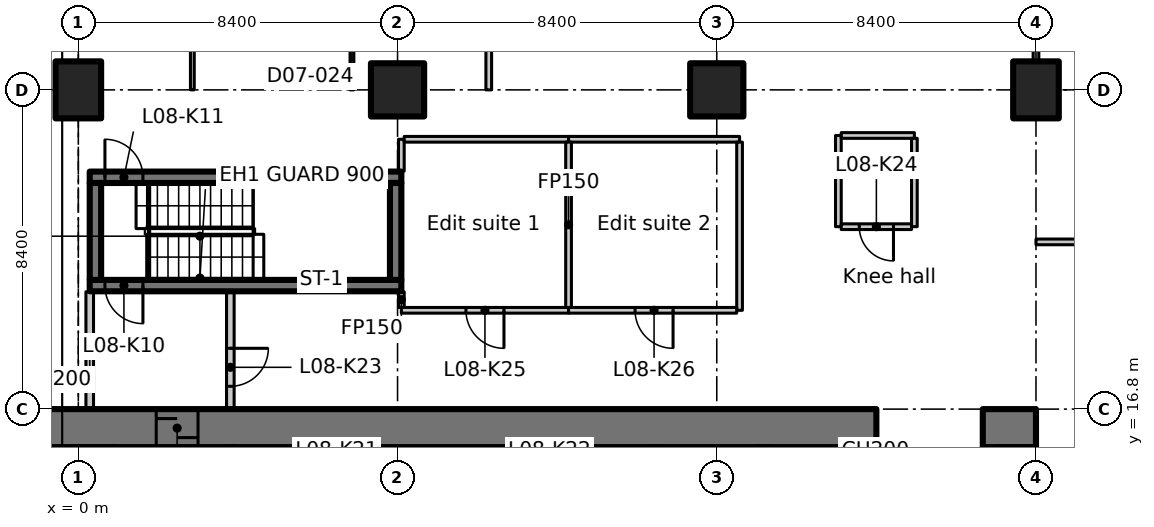
"""IFC4 building model, lengths in metres.
Left out: names, types, materials, properties, quantities, classifications, styles, units other than length and angle.
Written with IfcOpenShell. Run it as: python <this file> out.ifc"""

import sys

from ifc_helpers import new_model, si_unit, direction, frame, frame_2d, origin, origin_2d, place, context, subcontext, project, spatial, polyline, rectangle, outline, extrude, element, fill, save


model = new_model("IFC4")
c1 = context("Model", 3, precision=1e-05, world=origin(), true_north=direction((0.0, 1.0)))
c2 = subcontext(c1, "Body", "Model", "MODEL_VIEW")
j1 = project(units=[si_unit("LENGTHUNIT", "METRE"), si_unit("PLANEANGLEUNIT", "RADIAN")], contexts=[c1])
p1 = place(None, origin())
s1 = spatial("IfcSite", under=j1, at=p1, CompositionType="ELEMENT")
p2 = place(p1, origin())
s2 = spatial("IfcBuilding", under=s1, at=p2, CompositionType="ELEMENT")
p3 = place(p2, frame((0.0, 0.0, 43.7)))
s3 = spatial("IfcBuildingStorey", under=s2, at=p3, CompositionType="ELEMENT", Elevation=43.7)
p4 = place(p3, frame((0.0, 25.2, 0.0), z_axis=(0.0, 0.0, 1.0), x_axis=(1.0, 0.0, 0.0)))
e1 = element("IfcColumn", 1, at=p4, inside=s3, PredefinedType="COLUMN", context=c2, shape_type="SweptSolid", body=[
    extrude(rectangle(XDim=1.2, YDim=1.5, at=origin_2d()), origin(), (0.0, 0.0, 1.0), 3.35),
])
for number, where, z_axis, x_axis in (
    (2, (8.4, 25.2, 0.0), (0.0, 0.0, 1.0), (1.0, 0.0, 0.0)),
    (3, (16.8, 25.2, 0.0), (0.0, 0.0, 1.0), (1.0, 0.0, 0.0)),
):
    element("IfcColumn", number, at=place(p3, frame(where, z_axis=z_axis, x_axis=x_axis)), inside=s3, PredefinedType="COLUMN", context=c2, shape_type="SweptSolid", body=[
        extrude(rectangle(XDim=1.4, YDim=1.4, at=origin_2d()), origin(), (0.0, 0.0, 1.0), 3.35),
    ])
p5 = place(p3, frame((25.2, 25.2, 0.0), z_axis=(0.0, 0.0, 1.0), x_axis=(1.0, 0.0, 0.0)))
e4 = element("IfcColumn", 4, at=p5, inside=s3, PredefinedType="COLUMN", context=c2, shape_type="SweptSolid", body=[
    extrude(rectangle(XDim=1.2, YDim=1.5, at=origin_2d()), origin(), (0.0, 0.0, 1.0), 3.35),
])
p6 = place(p3, frame((-1.1, 16.3, 0.0), z_axis=(0.0, 0.0, 1.0), x_axis=(1.0, 0.0, 0.0)))
e5 = element("IfcWall", 5, at=p6, inside=s3, PredefinedType="SHEAR", context=c2, shape_type="SweptSolid", body=[
    extrude(rectangle(XDim=22.1, YDim=1.0, at=frame_2d((11.05, 0.0))), origin(), (0.0, 0.0, 1.0), 3.35),
])
p7 = place(p6, frame((3.15, 0.0, 0.0)))
e6 = element("IfcOpeningElement", 6, at=p7, cuts=e5, PredefinedType="OPENING", context=c2, shape_type="SweptSolid", body=[
    extrude(rectangle(XDim=1.1, YDim=2.3, at=frame_2d((0.55, 1.15))), frame((0.0, 0.51, 0.0), z_axis=(0.0, -1.0, 0.0), x_axis=(1.0, 0.0, 0.0)), (0.0, 0.0, 1.0), 1.02),
])
p8 = place(p3, frame((23.8, 16.3, 0.0), z_axis=(0.0, 0.0, 1.0), x_axis=(1.0, 0.0, 0.0)))
e7 = element("IfcWall", 7, at=p8, inside=s3, PredefinedType="SHEAR", context=c2, shape_type="SweptSolid", body=[
    extrude(rectangle(XDim=1.4, YDim=1.0, at=frame_2d((0.7, 0.0))), origin(), (0.0, 0.0, 1.0), 3.35),
])
p9 = place(p3, frame((24.7, 12.6, 0.0), z_axis=(0.0, 0.0, 1.0), x_axis=(0.0, 1.0, 0.0)))
e8 = element("IfcWall", 8, at=p9, inside=s3, PredefinedType="SHEAR", context=c2, shape_type="SweptSolid", body=[
    extrude(rectangle(XDim=3.2, YDim=1.0, at=frame_2d((1.6, 0.0))), origin(), (0.0, 0.0, 1.0), 3.35),
])
p10 = place(p3, frame((8.5, 20.05, 0.0), z_axis=(0.0, 0.0, 1.0), x_axis=(-1.0, 0.0, 0.0)))
e9 = element("IfcWall", 9, at=p10, inside=s3, PredefinedType="SHEAR", context=c2, shape_type="SweptSolid", body=[
    extrude(rectangle(XDim=8.2, YDim=0.3, at=frame_2d((4.1, 0.0))), origin(), (0.0, 0.0, 1.0), 3.35),
])
p11 = place(p10, frame((6.8, 0.0, 0.0)))
e10 = element("IfcOpeningElement", 10, at=p11, cuts=e9, PredefinedType="OPENING", context=c2, shape_type="SweptSolid", body=[
    extrude(rectangle(XDim=1.0, YDim=2.1, at=frame_2d((0.5, 1.05))), frame((0.0, 0.16, 0.0), z_axis=(0.0, -1.0, 0.0), x_axis=(1.0, 0.0, 0.0)), (0.0, 0.0, 1.0), 0.32),
])
p12 = place(p3, frame((0.3, 22.9, 0.0), z_axis=(0.0, 0.0, 1.0), x_axis=(1.0, 0.0, 0.0)))
e11 = element("IfcWall", 11, at=p12, inside=s3, PredefinedType="SHEAR", context=c2, shape_type="SweptSolid", body=[
    extrude(rectangle(XDim=8.2, YDim=0.3, at=frame_2d((4.1, 0.0))), origin(), (0.0, 0.0, 1.0), 3.35),
])
p13 = place(p12, frame((0.4, 0.0, 0.0)))
e12 = element("IfcOpeningElement", 12, at=p13, cuts=e11, PredefinedType="OPENING", context=c2, shape_type="SweptSolid", body=[
    extrude(rectangle(XDim=1.0, YDim=2.1, at=frame_2d((0.5, 1.05))), frame((0.0, 0.16, 0.0), z_axis=(0.0, -1.0, 0.0), x_axis=(1.0, 0.0, 0.0)), (0.0, 0.0, 1.0), 0.32),
])
for number, where, z_axis, x_axis in (
    (13, (0.45, 20.2, 0.0), (0.0, 0.0, 1.0), (0.0, 1.0, 0.0)),
    (14, (8.35, 20.2, 0.0), (0.0, 0.0, 1.0), (0.0, 1.0, 0.0)),
):
    element("IfcWall", number, at=place(p3, frame(where, z_axis=z_axis, x_axis=x_axis)), inside=s3, PredefinedType="SHEAR", context=c2, shape_type="SweptSolid", body=[
        extrude(rectangle(XDim=2.55, YDim=0.3, at=frame_2d((1.275, 0.0))), origin(), (0.0, 0.0, 1.0), 3.35),
    ])
p14 = place(p3, frame((0.3, 16.812, 0.0), z_axis=(0.0, 0.0, 1.0), x_axis=(0.0, 1.0, 0.0)))
e15 = element("IfcWall", 15, at=p14, inside=s3, PredefinedType="PARTITIONING", context=c2, shape_type="SweptSolid", body=[
    extrude(rectangle(XDim=3.076, YDim=0.2, at=frame_2d((1.538, 0.0))), origin(), (0.0, 0.0, 1.0), 2.98),
])
p15 = place(p3, frame((4.0, 19.888, 0.0), z_axis=(0.0, 0.0, 1.0), x_axis=(0.0, -1.0, 0.0)))
e16 = element("IfcWall", 16, at=p15, inside=s3, PredefinedType="PARTITIONING", context=c2, shape_type="SweptSolid", body=[
    extrude(rectangle(XDim=3.076, YDim=0.2, at=frame_2d((1.538, 0.0))), origin(), (0.0, 0.0, 1.0), 3.35),
])
p16 = place(p15, frame((1.488, 0.0, 0.0)))
e17 = element("IfcOpeningElement", 17, at=p16, cuts=e16, PredefinedType="OPENING", context=c2, shape_type="SweptSolid", body=[
    extrude(rectangle(XDim=1.0, YDim=2.1, at=frame_2d((0.5, 1.05))), frame((0.0, 0.11, 0.0), z_axis=(0.0, -1.0, 0.0), x_axis=(1.0, 0.0, 0.0)), (0.0, 0.0, 1.0), 0.22),
])
p17 = place(p3, frame((12.9, 19.4, 0.0), z_axis=(0.0, 0.0, 1.0), x_axis=(-1.0, 0.0, 0.0)))
e18 = element("IfcWall", 18, at=p17, inside=s3, PredefinedType="PARTITIONING", context=c2, shape_type="SweptSolid", body=[
    extrude(rectangle(XDim=4.4, YDim=0.15, at=frame_2d((2.2, 0.0))), origin(), (0.0, 0.0, 1.0), 3.35),
])
p18 = place(p17, frame((1.7, 0.0, 0.0)))
e19 = element("IfcOpeningElement", 19, at=p18, cuts=e18, PredefinedType="OPENING", context=c2, shape_type="SweptSolid", body=[
    extrude(rectangle(XDim=1.0, YDim=2.1, at=frame_2d((0.5, 1.05))), frame((0.0, 0.085, 0.0), z_axis=(0.0, -1.0, 0.0), x_axis=(1.0, 0.0, 0.0)), (0.0, 0.0, 1.0), 0.17),
])
p19 = place(p3, frame((8.5, 19.475, 0.0), z_axis=(0.0, 0.0, 1.0), x_axis=(0.0, 1.0, 0.0)))
e20 = element("IfcWall", 20, at=p19, inside=s3, PredefinedType="PARTITIONING", context=c2, shape_type="SweptSolid", body=[
    extrude(rectangle(XDim=0.413, YDim=0.15, at=frame_2d((0.207, 0.0))), origin(), (0.0, 0.0, 1.0), 3.35),
])
p20 = place(p3, frame((8.5, 23.062, 0.0), z_axis=(0.0, 0.0, 1.0), x_axis=(0.0, 1.0, 0.0)))
e21 = element("IfcWall", 21, at=p20, inside=s3, PredefinedType="PARTITIONING", context=c2, shape_type="SweptSolid", body=[
    extrude(rectangle(XDim=0.838, YDim=0.15, at=frame_2d((0.419, 0.0))), origin(), (0.0, 0.0, 1.0), 3.35),
])
p21 = place(p3, frame((8.575, 23.9, 0.0), z_axis=(0.0, 0.0, 1.0), x_axis=(1.0, 0.0, 0.0)))
e22 = element("IfcWall", 22, at=p21, inside=s3, PredefinedType="PARTITIONING", context=c2, shape_type="SweptSolid", body=[
    extrude(rectangle(XDim=4.325, YDim=0.15, at=frame_2d((2.163, 0.0))), origin(), (0.0, 0.0, 1.0), 3.35),
])
p22 = place(p3, frame((12.9, 23.9, 0.0), z_axis=(0.0, 0.0, 1.0), x_axis=(1.0, 0.0, 0.0)))
e23 = element("IfcWall", 23, at=p22, inside=s3, PredefinedType="PARTITIONING", context=c2, shape_type="SweptSolid", body=[
    extrude(rectangle(XDim=4.5, YDim=0.15, at=frame_2d((2.25, 0.0))), origin(), (0.0, 0.0, 1.0), 3.35),
])
p23 = place(p3, frame((17.4, 23.825, 0.0), z_axis=(0.0, 0.0, 1.0), x_axis=(0.0, -1.0, 0.0)))
e24 = element("IfcWall", 24, at=p23, inside=s3, PredefinedType="PARTITIONING", context=c2, shape_type="SweptSolid", body=[
    extrude(rectangle(XDim=4.425, YDim=0.15, at=frame_2d((2.212, 0.0))), origin(), (0.0, 0.0, 1.0), 3.35),
])
p24 = place(p3, frame((17.325, 19.4, 0.0), z_axis=(0.0, 0.0, 1.0), x_axis=(-1.0, 0.0, 0.0)))
e25 = element("IfcWall", 25, at=p24, inside=s3, PredefinedType="PARTITIONING", context=c2, shape_type="SweptSolid", body=[
    extrude(rectangle(XDim=4.425, YDim=0.15, at=frame_2d((2.212, 0.0))), origin(), (0.0, 0.0, 1.0), 3.35),
])
p25 = place(p24, frame((1.675, 0.0, 0.0)))
e26 = element("IfcOpeningElement", 26, at=p25, cuts=e25, PredefinedType="OPENING", context=c2, shape_type="SweptSolid", body=[
    extrude(rectangle(XDim=1.0, YDim=2.1, at=frame_2d((0.5, 1.05))), frame((0.0, 0.085, 0.0), z_axis=(0.0, -1.0, 0.0), x_axis=(1.0, 0.0, 0.0)), (0.0, 0.0, 1.0), 0.17),
])
p26 = place(p3, frame((12.9, 23.825, 0.0), z_axis=(0.0, 0.0, 1.0), x_axis=(0.0, -1.0, 0.0)))
e27 = element("IfcWall", 27, at=p26, inside=s3, PredefinedType="PARTITIONING", context=c2, shape_type="SweptSolid", body=[
    extrude(rectangle(XDim=4.35, YDim=0.15, at=frame_2d((2.175, 0.0))), origin(), (0.0, 0.0, 1.0), 3.35),
])
p27 = place(p3, frame((20.0, 21.6, 0.0), z_axis=(0.0, 0.0, 1.0), x_axis=(0.0, 1.0, 0.0)))
e28 = element("IfcWall", 28, at=p27, inside=s3, PredefinedType="PARTITIONING", context=c2, shape_type="SweptSolid", body=[
    extrude(rectangle(XDim=2.4, YDim=0.15, at=frame_2d((1.2, 0.0))), origin(), (0.0, 0.0, 1.0), 3.35),
])
p28 = place(p3, frame((20.075, 24.0, 0.0), z_axis=(0.0, 0.0, 1.0), x_axis=(1.0, 0.0, 0.0)))
e29 = element("IfcWall", 29, at=p28, inside=s3, PredefinedType="PARTITIONING", context=c2, shape_type="SweptSolid", body=[
    extrude(rectangle(XDim=1.925, YDim=0.15, at=frame_2d((0.962, 0.0))), origin(), (0.0, 0.0, 1.0), 3.35),
])
p29 = place(p3, frame((22.0, 23.925, 0.0), z_axis=(0.0, 0.0, 1.0), x_axis=(0.0, -1.0, 0.0)))
e30 = element("IfcWall", 30, at=p29, inside=s3, PredefinedType="PARTITIONING", context=c2, shape_type="SweptSolid", body=[
    extrude(rectangle(XDim=2.325, YDim=0.15, at=frame_2d((1.163, 0.0))), origin(), (0.0, 0.0, 1.0), 3.35),
])
p30 = place(p3, frame((21.925, 21.6, 0.0), z_axis=(0.0, 0.0, 1.0), x_axis=(-1.0, 0.0, 0.0)))
e31 = element("IfcWall", 31, at=p30, inside=s3, PredefinedType="PARTITIONING", context=c2, shape_type="SweptSolid", body=[
    extrude(rectangle(XDim=1.85, YDim=0.15, at=frame_2d((0.925, 0.0))), origin(), (0.0, 0.0, 1.0), 3.35),
])
p31 = place(p30, frame((0.475, 0.0, 0.0)))
e32 = element("IfcOpeningElement", 32, at=p31, cuts=e31, PredefinedType="OPENING", context=c2, shape_type="SweptSolid", body=[
    extrude(rectangle(XDim=0.9, YDim=2.1, at=frame_2d((0.45, 1.05))), frame((0.0, 0.085, 0.0), z_axis=(0.0, -1.0, 0.0), x_axis=(1.0, 0.0, 0.0)), (0.0, 0.0, 1.0), 0.17),
])
p32 = place(p3, frame((25.2, 21.2, 0.0), z_axis=(0.0, 0.0, 1.0), x_axis=(1.0, 0.0, 0.0)))
e33 = element("IfcWall", 33, at=p32, inside=s3, PredefinedType="PARTITIONING", context=c2, shape_type="SweptSolid", body=[
    extrude(rectangle(XDim=4.2, YDim=0.15, at=frame_2d((2.1, 0.0))), origin(), (0.0, 0.0, 1.0), 3.33),
])
p33 = place(p3, frame((25.2, 31.0, 0.0), z_axis=(0.0, 0.0, 1.0), x_axis=(0.0, -1.0, 0.0)))
e34 = element("IfcWall", 34, at=p33, inside=s3, PredefinedType="PARTITIONING", context=c2, shape_type="SweptSolid", body=[
    extrude(outline(polyline([(0.0, 0.0), (5.03, 0.0), (5.03, 2.98), (0.0, 2.98), (0.0, 0.0)])), frame((0.0, 0.075, 0.0), z_axis=(0.0, -1.0, 0.0), x_axis=(1.0, 0.0, 0.0)), (0.0, 0.0, 1.0), 0.15),
])
p34 = place(p33, frame((1.83, 0.0, 0.0)))
e35 = element("IfcOpeningElement", 35, at=p34, cuts=e34, PredefinedType="OPENING", context=c2, shape_type="SweptSolid", body=[
    extrude(rectangle(XDim=1.1, YDim=2.1, at=frame_2d((0.55, 1.05))), frame((0.0, 0.085, 0.0), z_axis=(0.0, -1.0, 0.0), x_axis=(1.0, 0.0, 0.0)), (0.0, 0.0, 1.0), 0.17),
])
p35 = place(p3, frame((10.8, 25.2, 0.0), z_axis=(0.0, 0.0, 1.0), x_axis=(0.0, 1.0, 0.0)))
e36 = element("IfcWall", 36, at=p35, inside=s3, PredefinedType="PARTITIONING", context=c2, shape_type="SweptSolid", body=[
    extrude(rectangle(XDim=4.2, YDim=0.15, at=frame_2d((2.1, 0.0))), origin(), (0.0, 0.0, 1.0), 3.33),
])
p36 = place(p3, frame((3.0, 29.4, 0.0), z_axis=(0.0, 0.0, 1.0), x_axis=(0.0, -1.0, 0.0)))
e37 = element("IfcWall", 37, at=p36, inside=s3, PredefinedType="PARTITIONING", context=c2, shape_type="SweptSolid", body=[
    extrude(rectangle(XDim=4.2, YDim=0.1, at=frame_2d((2.1, 0.0))), origin(), (0.0, 0.0, 1.0), 3.33),
])
p37 = place(p3, frame((7.2, 29.4, 0.0), z_axis=(0.0, 0.0, 1.0), x_axis=(0.0, -1.0, 0.0)))
e38 = element("IfcWall", 38, at=p37, inside=s3, PredefinedType="PARTITIONING", context=c2, shape_type="SweptSolid", body=[
    extrude(rectangle(XDim=4.2, YDim=0.1, at=frame_2d((2.1, 0.0))), origin(), (0.0, 0.0, 1.0), 3.33),
])
p38 = place(p37, frame((1.5, 0.0, 0.0)))
e39 = element("IfcOpeningElement", 39, at=p38, cuts=e38, PredefinedType="OPENING", context=c2, shape_type="SweptSolid", body=[
    extrude(rectangle(XDim=0.9, YDim=2.1, at=frame_2d((0.45, 1.05))), frame((0.0, 0.06, 0.0), z_axis=(0.0, -1.0, 0.0), x_axis=(1.0, 0.0, 0.0)), (0.0, 0.0, 1.0), 0.12),
])
p39 = place(p7, origin())
e40 = element("IfcDoor", 40, at=p39, inside=s3, OperationType="SLIDING_TO_LEFT", PredefinedType="DOOR", context=c2, shape_type="SweptSolid", body=[
    extrude(rectangle(XDim=1.1, YDim=2.3, at=frame_2d((0.55, 1.15))), frame((0.0, 0.025, 0.0), z_axis=(0.0, -1.0, 0.0), x_axis=(1.0, 0.0, 0.0)), (0.0, 0.0, 1.0), 0.05),
])
fill(e6, e40)
p40 = place(p11, origin())
e41 = element("IfcDoor", 41, at=p40, inside=s3, OperationType="SINGLE_SWING_RIGHT", PredefinedType="DOOR", context=c2, shape_type="SweptSolid", body=[
    extrude(rectangle(XDim=1.0, YDim=2.1, at=frame_2d((0.5, 1.05))), frame((0.0, 0.025, 0.0), z_axis=(0.0, -1.0, 0.0), x_axis=(1.0, 0.0, 0.0)), (0.0, 0.0, 1.0), 0.05),
])
fill(e10, e41)
p41 = place(p13, origin())
e42 = element("IfcDoor", 42, at=p41, inside=s3, OperationType="SINGLE_SWING_LEFT", PredefinedType="DOOR", context=c2, shape_type="SweptSolid", body=[
    extrude(rectangle(XDim=1.0, YDim=2.1, at=frame_2d((0.5, 1.05))), frame((0.0, 0.025, 0.0), z_axis=(0.0, -1.0, 0.0), x_axis=(1.0, 0.0, 0.0)), (0.0, 0.0, 1.0), 0.05),
])
fill(e12, e42)
p42 = place(p16, origin())
e43 = element("IfcDoor", 43, at=p42, inside=s3, OperationType="SINGLE_SWING_LEFT", PredefinedType="DOOR", context=c2, shape_type="SweptSolid", body=[
    extrude(rectangle(XDim=1.0, YDim=2.1, at=frame_2d((0.5, 1.05))), frame((0.0, 0.025, 0.0), z_axis=(0.0, -1.0, 0.0), x_axis=(1.0, 0.0, 0.0)), (0.0, 0.0, 1.0), 0.05),
])
fill(e17, e43)
p43 = place(p31, origin())
e44 = element("IfcDoor", 44, at=p43, inside=s3, OperationType="SINGLE_SWING_RIGHT", PredefinedType="DOOR", context=c2, shape_type="SweptSolid", body=[
    extrude(rectangle(XDim=0.9, YDim=2.1, at=frame_2d((0.45, 1.05))), frame((0.0, 0.025, 0.0), z_axis=(0.0, -1.0, 0.0), x_axis=(1.0, 0.0, 0.0)), (0.0, 0.0, 1.0), 0.05),
])
fill(e32, e44)
p44 = place(p18, origin())
e45 = element("IfcDoor", 45, at=p44, inside=s3, OperationType="SINGLE_SWING_LEFT", PredefinedType="DOOR", context=c2, shape_type="SweptSolid", body=[
    extrude(rectangle(XDim=1.0, YDim=2.1, at=frame_2d((0.5, 1.05))), frame((0.0, 0.025, 0.0), z_axis=(0.0, -1.0, 0.0), x_axis=(1.0, 0.0, 0.0)), (0.0, 0.0, 1.0), 0.05),
])
fill(e19, e45)
p45 = place(p25, origin())
e46 = element("IfcDoor", 46, at=p45, inside=s3, OperationType="SINGLE_SWING_RIGHT", PredefinedType="DOOR", context=c2, shape_type="SweptSolid", body=[
    extrude(rectangle(XDim=1.0, YDim=2.1, at=frame_2d((0.5, 1.05))), frame((0.0, 0.025, 0.0), z_axis=(0.0, -1.0, 0.0), x_axis=(1.0, 0.0, 0.0)), (0.0, 0.0, 1.0), 0.05),
])
fill(e26, e46)
save(model, sys.argv[1])
